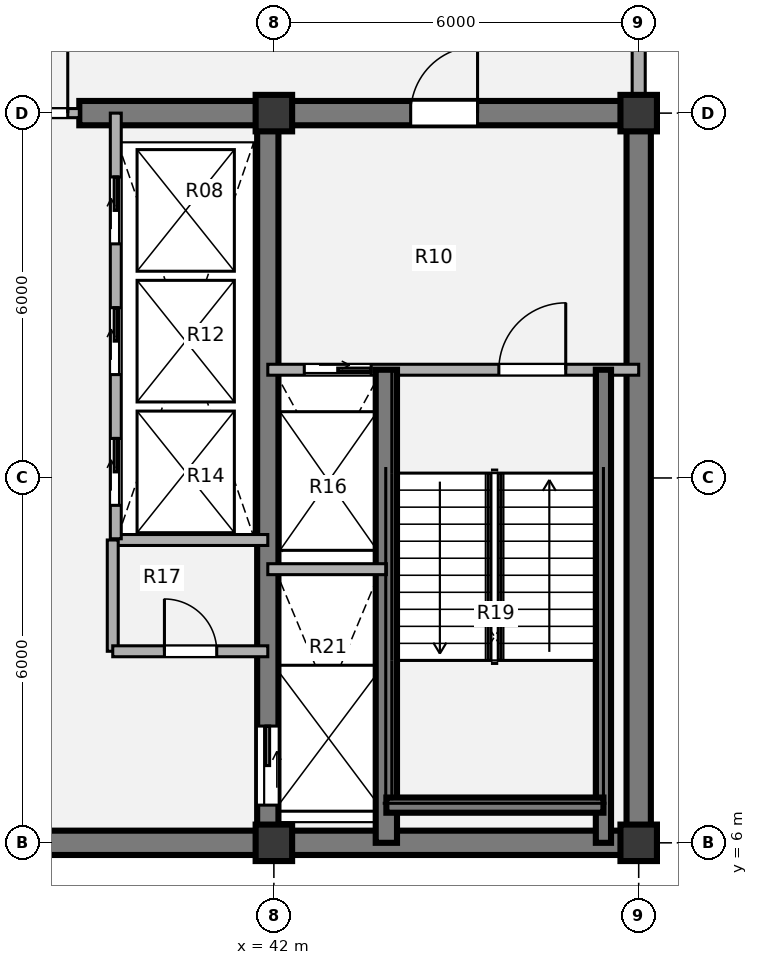
"""IFC4 building model, lengths in metres.
Left out: names, types, materials, properties, quantities, classifications, styles, units other than length and angle.
Written with IfcOpenShell. Run it as: python <this file> out.ifc"""

import sys

from ifc_helpers import new_model, si_unit, direction, frame, frame_2d, origin, origin_2d, place, context, subcontext, project, spatial, rectangle, extrude, source, transform, mapped, element, fill, save


model = new_model("IFC4")
c1 = context("Model", 3, precision=1e-05, world=origin(), true_north=direction((0.0, 1.0)))
c2 = subcontext(c1, "Body", "Model", "MODEL_VIEW")
j1 = project(units=[si_unit("LENGTHUNIT", "METRE"), si_unit("PLANEANGLEUNIT", "RADIAN")], contexts=[c1])
p1 = place(None, origin())
s1 = spatial("IfcSite", under=j1, at=p1, CompositionType="ELEMENT")
p2 = place(p1, origin())
s2 = spatial("IfcBuilding", under=s1, at=p2, CompositionType="ELEMENT")
p3 = place(p2, frame((0.0, 0.0, 218.52)))
s3 = spatial("IfcBuildingStorey", under=s2, at=p3, CompositionType="ELEMENT", Elevation=218.52)
m1 = source(origin(), c2, "Body", "SweptSolid", [
    extrude(rectangle(XDim=0.6, YDim=0.6, at=origin_2d()), origin(), (0.0, 0.0, 1.0), 4.5),
])
for number, where, z_axis, x_axis in (
    (1, (42.0, 6.0, 0.0), (0.0, 0.0, 1.0), (1.0, 0.0, 0.0)),
    (2, (48.0, 6.0, 0.0), (0.0, 0.0, 1.0), (1.0, 0.0, 0.0)),
    (3, (42.0, 18.0, 0.0), (0.0, 0.0, 1.0), (1.0, 0.0, 0.0)),
    (4, (48.0, 18.0, 0.0), (0.0, 0.0, 1.0), (1.0, 0.0, 0.0)),
):
    element("IfcColumn", number, at=place(p3, frame(where, z_axis=z_axis, x_axis=x_axis)), inside=s3, PredefinedType="COLUMN", context=c2, shape_type="MappedRepresentation", body=[
        mapped(m1, transform((0.0, 0.0, 0.0), x_axis=(1.0, 0.0, 0.0), y_axis=(0.0, 1.0, 0.0), z_axis=(0.0, 0.0, 1.0), scale=1.0)),
    ])
p4 = place(p3, frame((48.2, 6.0, 0.0), z_axis=(0.0, 0.0, 1.0), x_axis=(-1.0, 0.0, 0.0)))
e5 = element("IfcWall", 5, at=p4, inside=s3, PredefinedType="SHEAR", context=c2, shape_type="SweptSolid", body=[
    extrude(rectangle(XDim=24.4, YDim=0.4, at=frame_2d((12.2, 0.0))), origin(), (0.0, 0.0, 1.0), 4.5),
])
p5 = place(p3, frame((48.0, 18.0, 0.0), z_axis=(0.0, 0.0, 1.0), x_axis=(0.0, -1.0, 0.0)))
e6 = element("IfcWall", 6, at=p5, inside=s3, PredefinedType="SHEAR", context=c2, shape_type="SweptSolid", body=[
    extrude(rectangle(XDim=12.0, YDim=0.4, at=frame_2d((6.0, 0.0))), origin(), (0.0, 0.0, 1.0), 4.5),
])
p6 = place(p3, frame((38.8, 18.0, 0.0), z_axis=(0.0, 0.0, 1.0), x_axis=(1.0, 0.0, 0.0)))
e7 = element("IfcWall", 7, at=p6, inside=s3, PredefinedType="SHEAR", context=c2, shape_type="SweptSolid", body=[
    extrude(rectangle(XDim=9.4, YDim=0.4, at=frame_2d((4.7, 0.0))), origin(), (0.0, 0.0, 1.0), 4.5),
])
p7 = place(p6, frame((5.45, 0.0, 0.0)))
e8 = element("IfcOpeningElement", 8, at=p7, cuts=e7, PredefinedType="OPENING", context=c2, shape_type="SweptSolid", body=[
    extrude(rectangle(XDim=1.1, YDim=2.1, at=origin_2d()), frame((0.55, 0.21, 1.05), z_axis=(0.0, -1.0, 0.0), x_axis=(1.0, 0.0, 0.0)), (0.0, 0.0, 1.0), 0.42),
])
p8 = place(p3, frame((41.9, 18.0, 0.0), z_axis=(0.0, 0.0, 1.0), x_axis=(0.0, -1.0, 0.0)))
e9 = element("IfcWall", 9, at=p8, inside=s3, PredefinedType="SHEAR", context=c2, shape_type="SweptSolid", body=[
    extrude(rectangle(XDim=12.0, YDim=0.35, at=frame_2d((6.0, 0.0))), origin(), (0.0, 0.0, 1.0), 4.5),
])
p9 = place(p8, frame((10.08, 0.0, 0.0)))
e10 = element("IfcOpeningElement", 10, at=p9, cuts=e9, PredefinedType="OPENING", context=c2, shape_type="SweptSolid", body=[
    extrude(rectangle(XDim=1.3, YDim=2.1, at=origin_2d()), frame((0.65, 0.185, 1.05), z_axis=(0.0, -1.0, 0.0), x_axis=(1.0, 0.0, 0.0)), (0.0, 0.0, 1.0), 0.37),
])
p10 = place(p3, frame((48.0, 21.05, 0.0), z_axis=(0.0, 0.0, 1.0), x_axis=(0.0, -1.0, 0.0)))
e11 = element("IfcWall", 11, at=p10, inside=s3, PredefinedType="SOLIDWALL", context=c2, shape_type="SweptSolid", body=[
    extrude(rectangle(XDim=2.77, YDim=0.215, at=frame_2d((1.385, 0.0))), origin(), (0.0, 0.0, 1.0), 2.28),
])
p11 = place(p3, frame((39.35, 10.98, 0.0), z_axis=(0.0, 0.0, 1.0), x_axis=(1.0, 0.0, 0.0)))
e12 = element("IfcWall", 12, at=p11, inside=s3, PredefinedType="PARTITIONING", context=c2, shape_type="SweptSolid", body=[
    extrude(rectangle(XDim=2.55, YDim=0.18, at=frame_2d((1.275, 0.0))), origin(), (0.0, 0.0, 1.0), 4.062),
])
p12 = place(p3, frame((39.35, 9.15, 0.0), z_axis=(0.0, 0.0, 1.0), x_axis=(0.0, 1.0, 0.0)))
e13 = element("IfcWall", 13, at=p12, inside=s3, PredefinedType="PARTITIONING", context=c2, shape_type="SweptSolid", body=[
    extrude(rectangle(XDim=1.83, YDim=0.18, at=frame_2d((0.915, 0.0))), origin(), (0.0, 0.0, 1.0), 4.062),
])
p13 = place(p3, frame((39.35, 9.15, 0.0), z_axis=(0.0, 0.0, 1.0), x_axis=(1.0, 0.0, 0.0)))
e14 = element("IfcWall", 14, at=p13, inside=s3, PredefinedType="PARTITIONING", context=c2, shape_type="SweptSolid", body=[
    extrude(rectangle(XDim=2.55, YDim=0.18, at=frame_2d((1.275, 0.0))), origin(), (0.0, 0.0, 1.0), 4.062),
])
p14 = place(p13, frame((0.85, 0.0, 0.0)))
e15 = element("IfcOpeningElement", 15, at=p14, cuts=e14, PredefinedType="OPENING", context=c2, shape_type="SweptSolid", body=[
    extrude(rectangle(XDim=0.86, YDim=2.1, at=origin_2d()), frame((0.43, 0.1, 1.05), z_axis=(0.0, -1.0, 0.0), x_axis=(1.0, 0.0, 0.0)), (0.0, 0.0, 1.0), 0.2),
])
p15 = place(p3, frame((33.2, 18.0, 0.0), z_axis=(0.0, 0.0, 1.0), x_axis=(1.0, 0.0, 0.0)))
e16 = element("IfcWall", 16, at=p15, inside=s3, PredefinedType="PARTITIONING", context=c2, shape_type="SweptSolid", body=[
    extrude(rectangle(XDim=5.6, YDim=0.15, at=frame_2d((2.8, 0.0))), origin(), (0.0, 0.0, 1.0), 3.077),
])
p16 = place(p15, frame((0.19, 0.0, 0.0)))
e17 = element("IfcOpeningElement", 17, at=p16, cuts=e16, PredefinedType="OPENING", context=c2, shape_type="SweptSolid", body=[
    extrude(rectangle(XDim=1.1, YDim=2.1, at=origin_2d()), frame((0.55, 0.085, 1.05), z_axis=(0.0, -1.0, 0.0), x_axis=(1.0, 0.0, 0.0)), (0.0, 0.0, 1.0), 0.17),
])
p17 = place(p15, frame((4.31, 0.0, 0.0)))
e18 = element("IfcOpeningElement", 18, at=p17, cuts=e16, PredefinedType="OPENING", context=c2, shape_type="SweptSolid", body=[
    extrude(rectangle(XDim=1.1, YDim=2.1, at=origin_2d()), frame((0.55, 0.085, 1.05), z_axis=(0.0, -1.0, 0.0), x_axis=(1.0, 0.0, 0.0)), (0.0, 0.0, 1.0), 0.17),
])
p18 = place(p3, frame((41.9, 13.78, 0.0), z_axis=(0.0, 0.0, 1.0), x_axis=(1.0, 0.0, 0.0)))
e19 = element("IfcWall", 19, at=p18, inside=s3, PredefinedType="PARTITIONING", context=c2, shape_type="SweptSolid", body=[
    extrude(rectangle(XDim=6.1, YDim=0.18, at=frame_2d((3.05, 0.0))), origin(), (0.0, 0.0, 1.0), 4.062),
])
p19 = place(p18, frame((0.6, 0.0, 0.0)))
e20 = element("IfcOpeningElement", 20, at=p19, cuts=e19, PredefinedType="OPENING", context=c2, shape_type="SweptSolid", body=[
    extrude(rectangle(XDim=1.1, YDim=2.1, at=origin_2d()), frame((0.55, 0.1, 1.05), z_axis=(0.0, -1.0, 0.0), x_axis=(1.0, 0.0, 0.0)), (0.0, 0.0, 1.0), 0.2),
])
p20 = place(p18, frame((3.8, 0.0, 0.0)))
e21 = element("IfcOpeningElement", 21, at=p20, cuts=e19, PredefinedType="OPENING", context=c2, shape_type="SweptSolid", body=[
    extrude(rectangle(XDim=1.1, YDim=2.1, at=origin_2d()), frame((0.55, 0.1, 1.05), z_axis=(0.0, -1.0, 0.0), x_axis=(1.0, 0.0, 0.0)), (0.0, 0.0, 1.0), 0.2),
])
p21 = place(p3, frame((43.85, 6.0, 0.0), z_axis=(0.0, 0.0, 1.0), x_axis=(0.0, 1.0, 0.0)))
e22 = element("IfcWall", 22, at=p21, inside=s3, PredefinedType="SHEAR", context=c2, shape_type="SweptSolid", body=[
    extrude(rectangle(XDim=7.78, YDim=0.35, at=frame_2d((3.89, 0.0))), origin(), (0.0, 0.0, 1.0), 4.412),
])
p22 = place(p3, frame((47.42, 6.0, 0.0), z_axis=(0.0, 0.0, 1.0), x_axis=(0.0, 1.0, 0.0)))
e23 = element("IfcWall", 23, at=p22, inside=s3, PredefinedType="SHEAR", context=c2, shape_type="SweptSolid", body=[
    extrude(rectangle(XDim=7.78, YDim=0.25, at=frame_2d((3.89, 0.0))), origin(), (0.0, 0.0, 1.0), 4.412),
])
p23 = place(p3, frame((43.85, 6.62, 0.0), z_axis=(0.0, 0.0, 1.0), x_axis=(1.0, 0.0, 0.0)))
e24 = element("IfcWall", 24, at=p23, inside=s3, PredefinedType="SHEAR", context=c2, shape_type="SweptSolid", body=[
    extrude(rectangle(XDim=3.57, YDim=0.25, at=frame_2d((1.785, 0.0))), origin(), (0.0, 0.0, 1.0), 4.412),
])
p24 = place(p3, frame((41.9, 10.5, 0.0), z_axis=(0.0, 0.0, 1.0), x_axis=(1.0, 0.0, 0.0)))
e25 = element("IfcWall", 25, at=p24, inside=s3, PredefinedType="PARTITIONING", context=c2, shape_type="SweptSolid", body=[
    extrude(rectangle(XDim=1.95, YDim=0.18, at=frame_2d((0.975, 0.0))), origin(), (0.0, 0.0, 1.0), 4.062),
])
p25 = place(p3, frame((39.4, 11.0, 0.0), z_axis=(0.0, 0.0, 1.0), x_axis=(0.0, 1.0, 0.0)))
e26 = element("IfcWall", 26, at=p25, inside=s3, PredefinedType="PARTITIONING", context=c2, shape_type="SweptSolid", body=[
    extrude(rectangle(XDim=7.0, YDim=0.18, at=frame_2d((3.5, 0.0))), origin(), (0.0, 0.0, 1.0), 4.062),
])
p26 = place(p25, frame((0.55, 0.0, 0.0)))
e27 = element("IfcOpeningElement", 27, at=p26, cuts=e26, PredefinedType="OPENING", context=c2, shape_type="SweptSolid", body=[
    extrude(rectangle(XDim=1.1, YDim=2.1, at=origin_2d()), frame((0.55, 0.1, 1.05), z_axis=(0.0, -1.0, 0.0), x_axis=(1.0, 0.0, 0.0)), (0.0, 0.0, 1.0), 0.2),
])
p27 = place(p25, frame((2.7, 0.0, 0.0)))
e28 = element("IfcOpeningElement", 28, at=p27, cuts=e26, PredefinedType="OPENING", context=c2, shape_type="SweptSolid", body=[
    extrude(rectangle(XDim=1.1, YDim=2.1, at=origin_2d()), frame((0.55, 0.1, 1.05), z_axis=(0.0, -1.0, 0.0), x_axis=(1.0, 0.0, 0.0)), (0.0, 0.0, 1.0), 0.2),
])
p28 = place(p25, frame((4.85, 0.0, 0.0)))
e29 = element("IfcOpeningElement", 29, at=p28, cuts=e26, PredefinedType="OPENING", context=c2, shape_type="SweptSolid", body=[
    extrude(rectangle(XDim=1.1, YDim=2.1, at=origin_2d()), frame((0.55, 0.1, 1.05), z_axis=(0.0, -1.0, 0.0), x_axis=(1.0, 0.0, 0.0)), (0.0, 0.0, 1.0), 0.2),
])
m2 = source(origin(), c2, "Body", "SweptSolid", [
    extrude(rectangle(XDim=0.86, YDim=2.1, at=origin_2d()), frame((0.43, 0.025, 1.05), z_axis=(0.0, -1.0, 0.0), x_axis=(1.0, 0.0, 0.0)), (0.0, 0.0, 1.0), 0.05),
])
p29 = place(p14, origin())
e30 = element("IfcDoor", 30, at=p29, inside=s3, OperationType="SINGLE_SWING_LEFT", PredefinedType="DOOR", context=c2, shape_type="MappedRepresentation", body=[
    mapped(m2, transform((0.0, 0.0, 0.0), x_axis=(1.0, 0.0, 0.0), y_axis=(0.0, 1.0, 0.0), z_axis=(0.0, 0.0, 1.0), scale=1.0)),
])
fill(e15, e30)
m3 = source(origin(), c2, "Body", "SweptSolid", [
    extrude(rectangle(XDim=1.1, YDim=2.1, at=origin_2d()), frame((0.55, 0.025, 1.05), z_axis=(0.0, -1.0, 0.0), x_axis=(1.0, 0.0, 0.0)), (0.0, 0.0, 1.0), 0.05),
])
p30 = place(p17, origin())
e31 = element("IfcDoor", 31, at=p30, inside=s3, OperationType="SINGLE_SWING_RIGHT", PredefinedType="DOOR", context=c2, shape_type="MappedRepresentation", body=[
    mapped(m3, transform((0.0, 0.0, 0.0), x_axis=(1.0, 0.0, 0.0), y_axis=(0.0, 1.0, 0.0), z_axis=(0.0, 0.0, 1.0), scale=1.0)),
])
fill(e18, e31)
m4 = source(origin(), c2, "Body", "SweptSolid", [
    extrude(rectangle(XDim=1.1, YDim=2.1, at=origin_2d()), frame((0.55, 0.025, 1.05), z_axis=(0.0, -1.0, 0.0), x_axis=(1.0, 0.0, 0.0)), (0.0, 0.0, 1.0), 0.05),
])
p31 = place(p19, origin())
e32 = element("IfcDoor", 32, at=p31, inside=s3, OperationType="SLIDING_TO_RIGHT", PredefinedType="DOOR", context=c2, shape_type="MappedRepresentation", body=[
    mapped(m4, transform((0.0, 0.0, 0.0), x_axis=(1.0, 0.0, 0.0), y_axis=(0.0, 1.0, 0.0), z_axis=(0.0, 0.0, 1.0), scale=1.0)),
])
fill(e20, e32)
m5 = source(origin(), c2, "Body", "SweptSolid", [
    extrude(rectangle(XDim=1.1, YDim=2.1, at=origin_2d()), frame((0.55, 0.025, 1.05), z_axis=(0.0, -1.0, 0.0), x_axis=(1.0, 0.0, 0.0)), (0.0, 0.0, 1.0), 0.05),
])
p32 = place(p20, origin())
e33 = element("IfcDoor", 33, at=p32, inside=s3, OperationType="SINGLE_SWING_RIGHT", PredefinedType="DOOR", context=c2, shape_type="MappedRepresentation", body=[
    mapped(m5, transform((0.0, 0.0, 0.0), x_axis=(1.0, 0.0, 0.0), y_axis=(0.0, 1.0, 0.0), z_axis=(0.0, 0.0, 1.0), scale=1.0)),
])
fill(e21, e33)
m6 = source(origin(), c2, "Body", "SweptSolid", [
    extrude(rectangle(XDim=1.3, YDim=2.1, at=origin_2d()), frame((0.65, 0.025, 1.05), z_axis=(0.0, -1.0, 0.0), x_axis=(1.0, 0.0, 0.0)), (0.0, 0.0, 1.0), 0.05),
])
p33 = place(p9, origin())
e34 = element("IfcDoor", 34, at=p33, inside=s3, OperationType="SLIDING_TO_LEFT", PredefinedType="DOOR", context=c2, shape_type="MappedRepresentation", body=[
    mapped(m6, transform((0.0, 0.0, 0.0), x_axis=(1.0, 0.0, 0.0), y_axis=(0.0, 1.0, 0.0), z_axis=(0.0, 0.0, 1.0), scale=1.0)),
])
fill(e10, e34)
p34 = place(p7, origin())
e35 = element("IfcDoor", 35, at=p34, inside=s3, OperationType="SINGLE_SWING_RIGHT", PredefinedType="DOOR", context=c2, shape_type="MappedRepresentation", body=[
    mapped(m3, transform((0.0, 0.0, 0.0), x_axis=(1.0, 0.0, 0.0), y_axis=(0.0, 1.0, 0.0), z_axis=(0.0, 0.0, 1.0), scale=1.0)),
])
fill(e8, e35)
p35 = place(p26, origin())
e36 = element("IfcDoor", 36, at=p35, inside=s3, OperationType="SLIDING_TO_RIGHT", PredefinedType="DOOR", context=c2, shape_type="MappedRepresentation", body=[
    mapped(m4, transform((0.0, 0.0, 0.0), x_axis=(1.0, 0.0, 0.0), y_axis=(0.0, 1.0, 0.0), z_axis=(0.0, 0.0, 1.0), scale=1.0)),
])
fill(e27, e36)
p36 = place(p27, origin())
e37 = element("IfcDoor", 37, at=p36, inside=s3, OperationType="SLIDING_TO_RIGHT", PredefinedType="DOOR", context=c2, shape_type="MappedRepresentation", body=[
    mapped(m4, transform((0.0, 0.0, 0.0), x_axis=(1.0, 0.0, 0.0), y_axis=(0.0, 1.0, 0.0), z_axis=(0.0, 0.0, 1.0), scale=1.0)),
])
fill(e28, e37)
p37 = place(p28, origin())
e38 = element("IfcDoor", 38, at=p37, inside=s3, OperationType="SLIDING_TO_RIGHT", PredefinedType="DOOR", context=c2, shape_type="MappedRepresentation", body=[
    mapped(m4, transform((0.0, 0.0, 0.0), x_axis=(1.0, 0.0, 0.0), y_axis=(0.0, 1.0, 0.0), z_axis=(0.0, 0.0, 1.0), scale=1.0)),
])
fill(e29, e38)
save(model, sys.argv[1])
